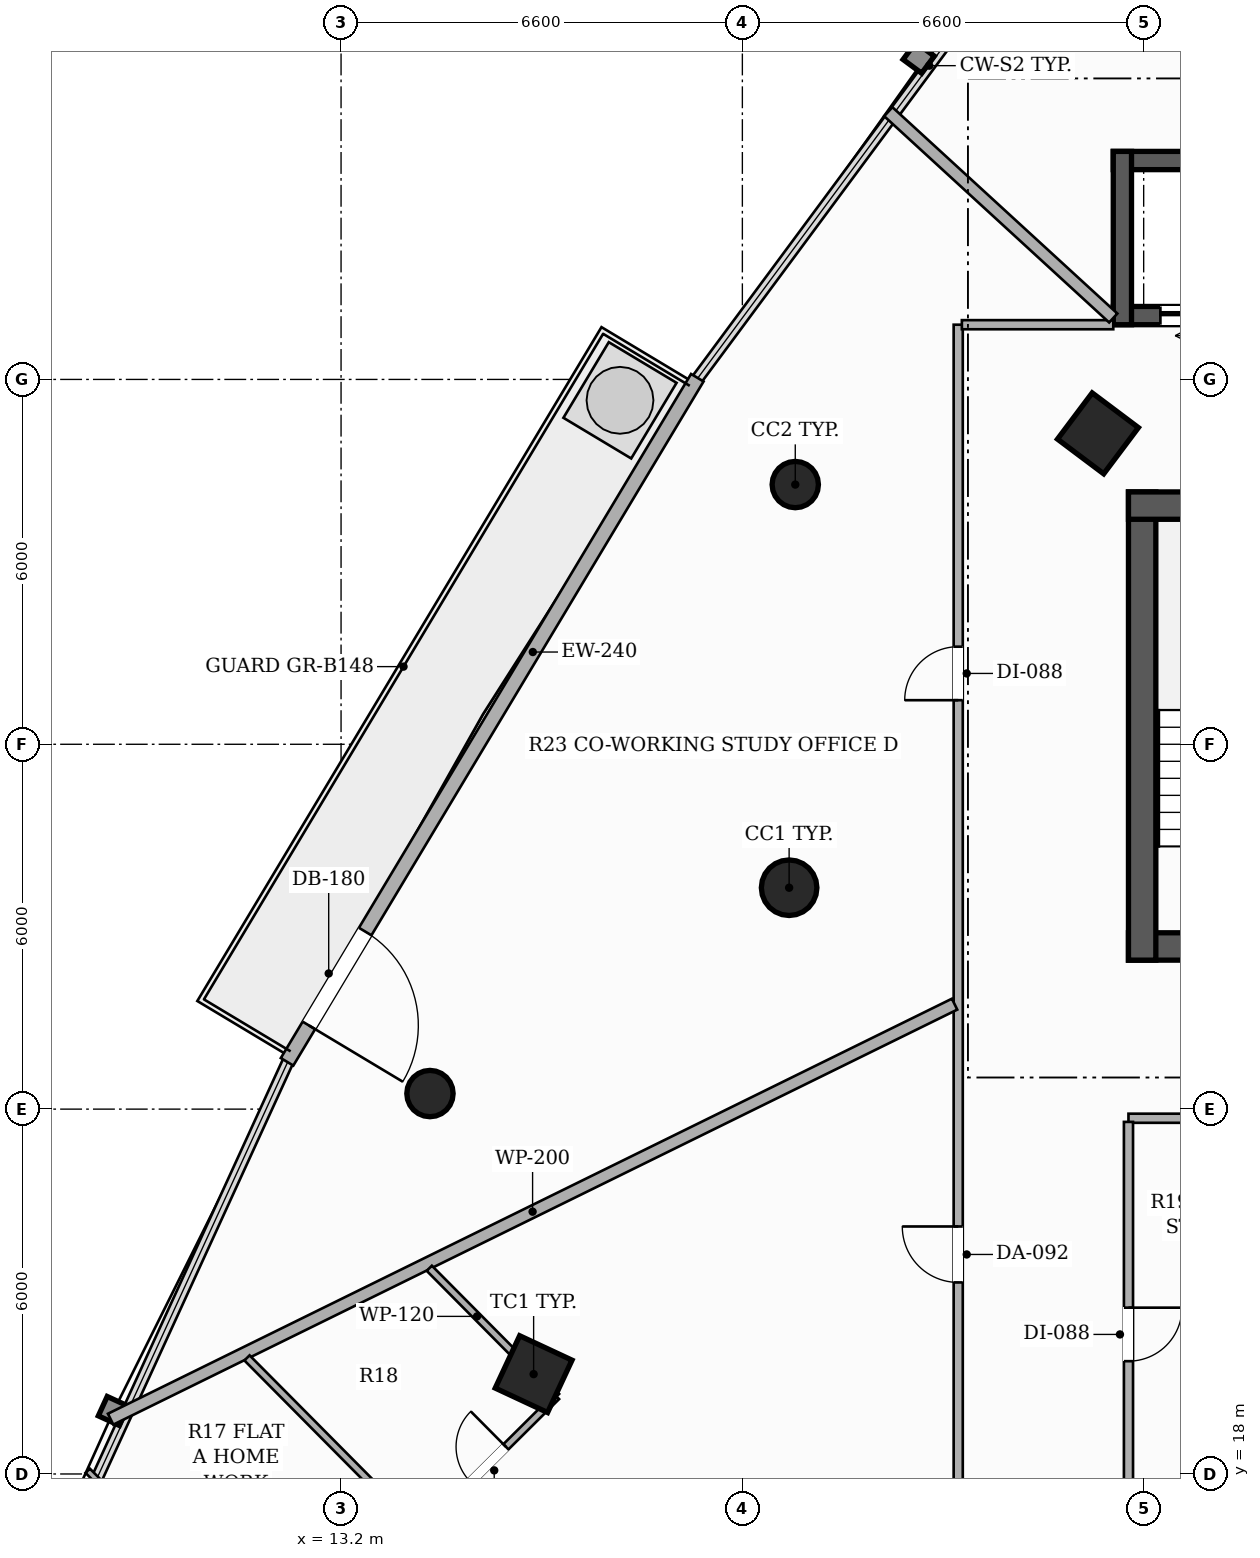
"""IFC4 building model, lengths in metres.
Left out: names, types, materials, properties, quantities, classifications, styles, units other than length and angle.
Written with IfcOpenShell. Run it as: python <this file> out.ifc"""

import sys

from ifc_helpers import new_model, si_unit, direction, frame, frame_2d, origin, origin_2d, place, context, subcontext, project, spatial, rectangle, hollow_rectangle, hollow_circle, extrude, element, fill, save


model = new_model("IFC4")
c1 = context("Model", 3, precision=1e-05, world=origin(), true_north=direction((0.0, 1.0)))
c2 = subcontext(c1, "Body", "Model", "MODEL_VIEW")
j1 = project(units=[si_unit("LENGTHUNIT", "METRE"), si_unit("PLANEANGLEUNIT", "RADIAN")], contexts=[c1])
p1 = place(None, origin())
s1 = spatial("IfcSite", under=j1, at=p1, CompositionType="ELEMENT")
p2 = place(p1, origin())
s2 = spatial("IfcBuilding", under=s1, at=p2, CompositionType="ELEMENT")
p3 = place(p2, frame((0.0, 0.0, 33.5)))
s3 = spatial("IfcBuildingStorey", under=s2, at=p3, CompositionType="ELEMENT", Elevation=33.5)
p4 = place(p3, frame((26.15, 26.675, 0.0), z_axis=(0.0, 0.0, 1.0), x_axis=(1.0, 0.0, 0.0)))
e1 = element("IfcWall", 1, at=p4, inside=s3, PredefinedType="SHEAR", context=c2, shape_type="SweptSolid", body=[
    extrude(rectangle(XDim=13.7, YDim=0.45, at=frame_2d((6.85, 0.0))), origin(), (0.0, 0.0, 1.0), 3.3),
])
p5 = place(p4, frame((4.35, 0.0, 0.0)))
e2 = element("IfcOpeningElement", 2, at=p5, cuts=e1, PredefinedType="OPENING", context=c2, shape_type="SweptSolid", body=[
    extrude(rectangle(XDim=1.05, YDim=2.15, at=frame_2d((0.525, 1.075))), frame((0.0, 0.235, 0.0), z_axis=(0.0, -1.0, 0.0), x_axis=(1.0, 0.0, 0.0)), (0.0, 0.0, 1.0), 0.47),
])
p6 = place(p4, frame((8.3, 0.0, 0.0)))
e3 = element("IfcOpeningElement", 3, at=p6, cuts=e1, PredefinedType="OPENING", context=c2, shape_type="SweptSolid", body=[
    extrude(rectangle(XDim=1.05, YDim=2.15, at=frame_2d((0.525, 1.075))), frame((0.0, 0.235, 0.0), z_axis=(0.0, -1.0, 0.0), x_axis=(1.0, 0.0, 0.0)), (0.0, 0.0, 1.0), 0.47),
])
p7 = place(p3, frame((26.375, 26.45, 0.0), z_axis=(0.0, 0.0, 1.0), x_axis=(0.0, 1.0, 0.0)))
e4 = element("IfcWall", 4, at=p7, inside=s3, PredefinedType="SHEAR", context=c2, shape_type="SweptSolid", body=[
    extrude(rectangle(XDim=7.7, YDim=0.45, at=frame_2d((3.85, 0.0))), origin(), (0.0, 0.0, 1.0), 3.3),
])
p8 = place(p3, frame((26.15, 33.925, 0.0), z_axis=(0.0, 0.0, 1.0), x_axis=(1.0, 0.0, 0.0)))
e5 = element("IfcWall", 5, at=p8, inside=s3, PredefinedType="SHEAR", context=c2, shape_type="SweptSolid", body=[
    extrude(rectangle(XDim=3.75, YDim=0.45, at=frame_2d((1.875, 0.0))), origin(), (0.0, 0.0, 1.0), 3.3),
])
p9 = place(p3, frame((40.1, 37.05, 0.0), z_axis=(0.0, 0.0, 1.0), x_axis=(-1.0, 0.0, 0.0)))
e6 = element("IfcWall", 6, at=p9, inside=s3, PredefinedType="SHEAR", context=c2, shape_type="SweptSolid", body=[
    extrude(rectangle(XDim=14.2, YDim=0.3, at=frame_2d((7.1, 0.0))), origin(), (0.0, 0.0, 1.0), 3.3),
])
p10 = place(p9, frame((12.325, 0.0, 0.0)))
e7 = element("IfcOpeningElement", 7, at=p10, cuts=e6, PredefinedType="OPENING", context=c2, shape_type="SweptSolid", body=[
    extrude(rectangle(XDim=1.1, YDim=2.2, at=frame_2d((0.55, 1.1))), frame((0.0, 0.16, 0.0), z_axis=(0.0, -1.0, 0.0), x_axis=(1.0, 0.0, 0.0)), (0.0, 0.0, 1.0), 0.32),
])
p11 = place(p9, frame((0.775, 0.0, 0.0)))
e8 = element("IfcOpeningElement", 8, at=p11, cuts=e6, PredefinedType="OPENING", context=c2, shape_type="SweptSolid", body=[
    extrude(rectangle(XDim=1.1, YDim=2.2, at=frame_2d((0.55, 1.1))), frame((0.0, 0.16, 0.0), z_axis=(0.0, -1.0, 0.0), x_axis=(1.0, 0.0, 0.0)), (0.0, 0.0, 1.0), 0.32),
])
p12 = place(p3, frame((25.9, 39.6, 0.0), z_axis=(0.0, 0.0, 1.0), x_axis=(1.0, 0.0, 0.0)))
e9 = element("IfcWall", 9, at=p12, inside=s3, PredefinedType="SHEAR", context=c2, shape_type="SweptSolid", body=[
    extrude(rectangle(XDim=14.2, YDim=0.3, at=frame_2d((7.1, 0.0))), origin(), (0.0, 0.0, 1.0), 3.3),
])
p13 = place(p3, frame((26.05, 36.9, 0.0), z_axis=(0.0, 0.0, 1.0), x_axis=(0.0, 1.0, 0.0)))
e10 = element("IfcWall", 10, at=p13, inside=s3, PredefinedType="SHEAR", context=c2, shape_type="SweptSolid", body=[
    extrude(rectangle(XDim=2.85, YDim=0.3, at=frame_2d((1.425, 0.0))), origin(), (0.0, 0.0, 1.0), 3.3),
])
p14 = place(p3, frame((25.648, 35.113, 0.0), z_axis=(0.0, 0.0, 1.0), x_axis=(0.600420225326, 0.799684658487, 0.0)))
e11 = element("IfcColumn", 11, at=p14, inside=s3, PredefinedType="COLUMN", context=c2, shape_type="SweptSolid", body=[
    extrude(hollow_rectangle(XDim=0.95, YDim=0.95, WallThickness=0.032, at=origin_2d()), origin(), (0.0, 0.0, 1.0), 3.3),
])
p15 = place(p3, frame((20.569, 27.641, 0.0), z_axis=(0.0, 0.0, 1.0), x_axis=(1.0, 0.0, 0.0)))
e12 = element("IfcColumn", 12, at=p15, inside=s3, PredefinedType="COLUMN", context=c2, shape_type="SweptSolid", body=[
    extrude(hollow_circle(Radius=0.457, WallThickness=0.025, at=origin_2d()), origin(), (0.0, 0.0, 1.0), 3.3),
])
p16 = place(p3, frame((16.367, 19.642, 0.0), z_axis=(0.0, 0.0, 1.0), x_axis=(0.422618261741, 0.906307787037, 0.0)))
e13 = element("IfcColumn", 13, at=p16, inside=s3, PredefinedType="COLUMN", context=c2, shape_type="SweptSolid", body=[
    extrude(hollow_rectangle(XDim=0.95, YDim=0.95, WallThickness=0.032, at=origin_2d()), origin(), (0.0, 0.0, 1.0), 3.3),
])
for number, where, z_axis, x_axis in (
    (14, (20.67, 34.271, 0.0), (0.0, 0.0, 1.0), (1.0, 0.0, 0.0)),
    (15, (14.662, 24.256, 0.0), (0.0, 0.0, 1.0), (1.0, 0.0, 0.0)),
):
    element("IfcColumn", number, at=place(p3, frame(where, z_axis=z_axis, x_axis=x_axis)), inside=s3, PredefinedType="COLUMN", context=c2, shape_type="SweptSolid", body=[
        extrude(hollow_circle(Radius=0.381, WallThickness=0.022, at=origin_2d()), origin(), (0.0, 0.0, 1.0), 3.3),
    ])
p17 = place(p3, frame((19.059, 36.028, 0.0), z_axis=(0.0, 0.0, 1.0), x_axis=(-0.514331531946, -0.857591438417, 0.0)))
e16 = element("IfcWall", 16, at=p17, inside=s3, PredefinedType="SOLIDWALL", context=c2, shape_type="SweptSolid", body=[
    extrude(rectangle(XDim=13.118, YDim=0.24, at=frame_2d((6.559, 0.0))), origin(), (0.0, 0.0, 1.0), 2.624),
])
p18 = place(p17, frame((10.62, 0.0, 0.0)))
e17 = element("IfcOpeningElement", 17, at=p18, cuts=e16, PredefinedType="OPENING", context=c2, shape_type="SweptSolid", body=[
    extrude(rectangle(XDim=1.8, YDim=2.2, at=frame_2d((0.9, 1.1))), frame((0.0, 0.13, 0.0), z_axis=(0.0, -1.0, 0.0), x_axis=(1.0, 0.0, 0.0)), (0.0, 0.0, 1.0), 0.26),
])
p19 = place(p3, frame((23.35, 11.86, 0.0), z_axis=(0.0, 0.0, 1.0), x_axis=(0.0, 1.0, 0.0)))
e18 = element("IfcWall", 18, at=p19, inside=s3, PredefinedType="PARTITIONING", context=c2, shape_type="SweptSolid", body=[
    extrude(rectangle(XDim=25.04, YDim=0.15, at=frame_2d((12.52, 0.0))), origin(), (0.0, 0.0, 1.0), 2.413),
])
p20 = place(p19, frame((9.29, 0.0, 0.0)))
e19 = element("IfcOpeningElement", 19, at=p20, cuts=e18, PredefinedType="OPENING", context=c2, shape_type="SweptSolid", body=[
    extrude(rectangle(XDim=0.92, YDim=2.15, at=frame_2d((0.46, 1.075))), frame((0.0, 0.085, 0.0), z_axis=(0.0, -1.0, 0.0), x_axis=(1.0, 0.0, 0.0)), (0.0, 0.0, 1.0), 0.17),
])
p21 = place(p19, frame((18.865, 0.0, 0.0)))
e20 = element("IfcOpeningElement", 20, at=p21, cuts=e18, PredefinedType="OPENING", context=c2, shape_type="SweptSolid", body=[
    extrude(rectangle(XDim=0.88, YDim=2.1, at=frame_2d((0.44, 1.05))), frame((0.0, 0.085, 0.0), z_axis=(0.0, -1.0, 0.0), x_axis=(1.0, 0.0, 0.0)), (0.0, 0.0, 1.0), 0.17),
])
p22 = place(p19, frame((2.566, 0.0, 0.0)))
e21 = element("IfcOpeningElement", 21, at=p22, cuts=e18, PredefinedType="OPENING", context=c2, shape_type="SweptSolid", body=[
    extrude(rectangle(XDim=0.92, YDim=2.15, at=frame_2d((0.46, 1.075))), frame((0.0, 0.085, 0.0), z_axis=(0.0, -1.0, 0.0), x_axis=(1.0, 0.0, 0.0)), (0.0, 0.0, 1.0), 0.17),
])
p23 = place(p3, frame((23.41, 36.9, 0.0), z_axis=(0.0, 0.0, 1.0), x_axis=(1.0, 0.0, 0.0)))
e22 = element("IfcWall", 22, at=p23, inside=s3, PredefinedType="PARTITIONING", context=c2, shape_type="SweptSolid", body=[
    extrude(rectangle(XDim=2.49, YDim=0.15, at=frame_2d((1.245, 0.0))), origin(), (0.0, 0.0, 1.0), 2.413),
])
p24 = place(p3, frame((31.545, 23.85, 0.0), z_axis=(0.0, 0.0, 1.0), x_axis=(-1.0, 0.0, 0.0)))
e23 = element("IfcWall", 23, at=p24, inside=s3, PredefinedType="PARTITIONING", context=c2, shape_type="SweptSolid", body=[
    extrude(rectangle(XDim=5.395, YDim=0.15, at=frame_2d((2.698, 0.0))), origin(), (0.0, 0.0, 1.0), 2.669),
])
p25 = place(p3, frame((26.15, 23.79, 0.0), z_axis=(0.0, 0.0, 1.0), x_axis=(0.0, -1.0, 0.0)))
e24 = element("IfcWall", 24, at=p25, inside=s3, PredefinedType="PARTITIONING", context=c2, shape_type="SweptSolid", body=[
    extrude(rectangle(XDim=6.99, YDim=0.15, at=frame_2d((3.495, 0.0))), origin(), (0.0, 0.0, 1.0), 2.669),
])
p26 = place(p25, frame((3.055, 0.0, 0.0)))
e25 = element("IfcOpeningElement", 25, at=p26, cuts=e24, PredefinedType="OPENING", context=c2, shape_type="SweptSolid", body=[
    extrude(rectangle(XDim=0.88, YDim=2.1, at=frame_2d((0.44, 1.05))), frame((0.0, 0.085, 0.0), z_axis=(0.0, -1.0, 0.0), x_axis=(1.0, 0.0, 0.0)), (0.0, 0.0, 1.0), 0.17),
])
p27 = place(p3, frame((9.41, 18.901, 0.0), z_axis=(0.0, 0.0, 1.0), x_axis=(0.89737804177, 0.44126256373, 0.0)))
e26 = element("IfcWall", 26, at=p27, inside=s3, PredefinedType="PARTITIONING", context=c2, shape_type="SweptSolid", body=[
    extrude(rectangle(XDim=15.468, YDim=0.2, at=frame_2d((7.734, 0.0))), origin(), (0.0, 0.0, 1.0), 2.413),
])
p28 = place(p3, frame((25.9, 37.01, 0.0), z_axis=(0.0, 0.0, 1.0), x_axis=(-0.737010798249, 0.675880968266, 0.0)))
e27 = element("IfcWall", 27, at=p28, inside=s3, PredefinedType="PARTITIONING", context=c2, shape_type="SweptSolid", body=[
    extrude(rectangle(XDim=5.02, YDim=0.2, at=frame_2d((2.51, 0.0))), origin(), (0.0, 0.0, 1.0), 3.06),
])
p29 = place(p3, frame((14.497, 17.043, 0.0), z_axis=(0.0, 0.0, 1.0), x_axis=(0.709608291954, 0.704596389425, 0.0)))
e28 = element("IfcWall", 28, at=p29, inside=s3, PredefinedType="PARTITIONING", context=c2, shape_type="SweptSolid", body=[
    extrude(rectangle(XDim=3.166, YDim=0.12, at=frame_2d((1.583, 0.0))), origin(), (0.0, 0.0, 1.0), 2.413),
])
p30 = place(p29, frame((1.173, 0.0, 0.0)))
e29 = element("IfcOpeningElement", 29, at=p30, cuts=e28, PredefinedType="OPENING", context=c2, shape_type="SweptSolid", body=[
    extrude(rectangle(XDim=0.82, YDim=2.1, at=frame_2d((0.41, 1.05))), frame((0.0, 0.07, 0.0), z_axis=(0.0, -1.0, 0.0), x_axis=(1.0, 0.0, 0.0)), (0.0, 0.0, 1.0), 0.14),
])
p31 = place(p3, frame((16.744, 19.274, 0.0), z_axis=(0.0, 0.0, 1.0), x_axis=(-0.704390177625, 0.709812987811, 0.0)))
e30 = element("IfcWall", 30, at=p31, inside=s3, PredefinedType="PARTITIONING", context=c2, shape_type="SweptSolid", body=[
    extrude(rectangle(XDim=2.971, YDim=0.12, at=frame_2d((1.486, 0.0))), origin(), (0.0, 0.0, 1.0), 2.413),
])
p32 = place(p3, frame((14.497, 17.043, 0.0), z_axis=(0.0, 0.0, 1.0), x_axis=(-0.704380529073, 0.70982256252, 0.0)))
e31 = element("IfcWall", 31, at=p32, inside=s3, PredefinedType="PARTITIONING", context=c2, shape_type="SweptSolid", body=[
    extrude(rectangle(XDim=4.038, YDim=0.12, at=frame_2d((2.019, 0.0))), origin(), (0.0, 0.0, 1.0), 2.413),
])
p33 = place(p3, frame((9.033, 18.053, 0.0), z_axis=(0.0, 0.0, 1.0), x_axis=(0.704374497722, -0.709828547579, 0.0)))
e32 = element("IfcWall", 32, at=p33, inside=s3, PredefinedType="PARTITIONING", context=c2, shape_type="SweptSolid", body=[
    extrude(rectangle(XDim=4.566, YDim=0.1, at=frame_2d((2.283, 0.0))), origin(), (0.0, 0.0, 1.0), 2.413),
])
p34 = place(p18, origin())
e33 = element("IfcDoor", 33, at=p34, inside=s3, OperationType="SINGLE_SWING_RIGHT", PredefinedType="DOOR", context=c2, shape_type="SweptSolid", body=[
    extrude(rectangle(XDim=1.8, YDim=2.2, at=frame_2d((0.9, 1.1))), frame((0.0, 0.025, 0.0), z_axis=(0.0, -1.0, 0.0), x_axis=(1.0, 0.0, 0.0)), (0.0, 0.0, 1.0), 0.05),
])
fill(e17, e33)
p35 = place(p10, origin())
e34 = element("IfcDoor", 34, at=p35, inside=s3, OperationType="DOUBLE_DOOR_SLIDING", PredefinedType="DOOR", context=c2, shape_type="SweptSolid", body=[
    extrude(rectangle(XDim=1.1, YDim=2.2, at=frame_2d((0.55, 1.1))), frame((0.0, 0.025, 0.0), z_axis=(0.0, -1.0, 0.0), x_axis=(1.0, 0.0, 0.0)), (0.0, 0.0, 1.0), 0.05),
])
fill(e7, e34)
p36 = place(p20, origin())
e35 = element("IfcDoor", 35, at=p36, inside=s3, OperationType="SINGLE_SWING_RIGHT", PredefinedType="DOOR", context=c2, shape_type="SweptSolid", body=[
    extrude(rectangle(XDim=0.92, YDim=2.15, at=frame_2d((0.46, 1.075))), frame((0.0, 0.025, 0.0), z_axis=(0.0, -1.0, 0.0), x_axis=(1.0, 0.0, 0.0)), (0.0, 0.0, 1.0), 0.05),
])
fill(e19, e35)
p37 = place(p30, origin())
e36 = element("IfcDoor", 36, at=p37, inside=s3, OperationType="SINGLE_SWING_RIGHT", PredefinedType="DOOR", context=c2, shape_type="SweptSolid", body=[
    extrude(rectangle(XDim=0.82, YDim=2.1, at=frame_2d((0.41, 1.05))), frame((0.0, 0.025, 0.0), z_axis=(0.0, -1.0, 0.0), x_axis=(1.0, 0.0, 0.0)), (0.0, 0.0, 1.0), 0.05),
])
fill(e29, e36)
p38 = place(p21, origin())
e37 = element("IfcDoor", 37, at=p38, inside=s3, OperationType="SINGLE_SWING_LEFT", PredefinedType="DOOR", context=c2, shape_type="SweptSolid", body=[
    extrude(rectangle(XDim=0.88, YDim=2.1, at=frame_2d((0.44, 1.05))), frame((0.0, 0.025, 0.0), z_axis=(0.0, -1.0, 0.0), x_axis=(1.0, 0.0, 0.0)), (0.0, 0.0, 1.0), 0.05),
])
fill(e20, e37)
p39 = place(p26, origin())
e38 = element("IfcDoor", 38, at=p39, inside=s3, OperationType="SINGLE_SWING_LEFT", PredefinedType="DOOR", context=c2, shape_type="SweptSolid", body=[
    extrude(rectangle(XDim=0.88, YDim=2.1, at=frame_2d((0.44, 1.05))), frame((0.0, 0.025, 0.0), z_axis=(0.0, -1.0, 0.0), x_axis=(1.0, 0.0, 0.0)), (0.0, 0.0, 1.0), 0.05),
])
fill(e25, e38)
save(model, sys.argv[1])
